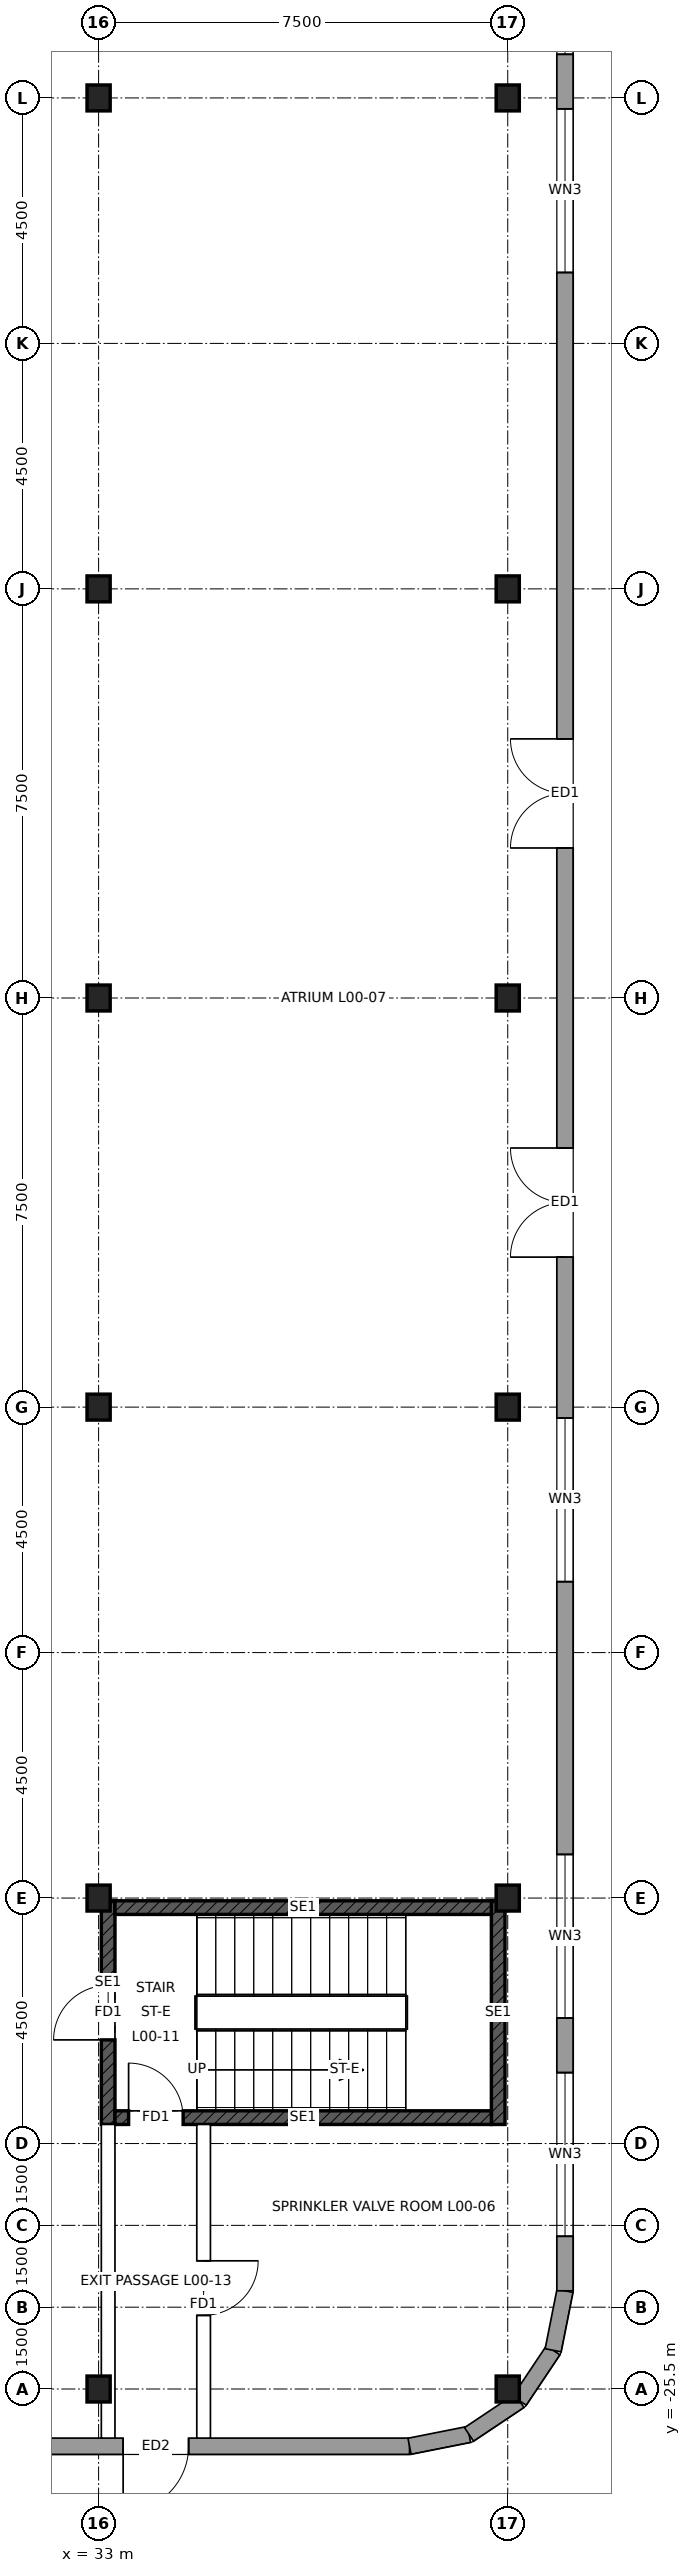
"""IFC4 building model, lengths in metres.
Left out: names, types, materials, properties, quantities, classifications, styles, units other than length and angle.
Written with IfcOpenShell. Run it as: python <this file> out.ifc"""

import sys

from ifc_helpers import new_model, si_unit, direction, frame, frame_2d, origin, origin_2d, place, context, subcontext, project, spatial, rectangle, i_section, extrude, element, fill, save


model = new_model("IFC4")
c1 = context("Model", 3, precision=1e-05, world=origin(), true_north=direction((0.0, 1.0)))
c2 = subcontext(c1, "Body", "Model", "MODEL_VIEW")
j1 = project(units=[si_unit("LENGTHUNIT", "METRE"), si_unit("PLANEANGLEUNIT", "RADIAN")], contexts=[c1])
p1 = place(None, origin())
s1 = spatial("IfcSite", under=j1, at=p1, CompositionType="ELEMENT")
p2 = place(p1, origin())
s2 = spatial("IfcBuilding", under=s1, at=p2, CompositionType="ELEMENT")
p3 = place(p2, origin())
s3 = spatial("IfcBuildingStorey", under=s2, at=p3, CompositionType="ELEMENT", Elevation=0.0)
for number, where, z_axis, x_axis in (
    (1, (33.0, -25.5, -0.3), (0.0, 0.0, 1.0), (1.0, 0.0, 0.0)),
    (2, (33.0, -16.5, -0.3), (0.0, 0.0, 1.0), (1.0, 0.0, 0.0)),
    (3, (33.0, -7.5, -0.3), (0.0, 0.0, 1.0), (1.0, 0.0, 0.0)),
    (4, (33.0, 0.0, -0.3), (0.0, 0.0, 1.0), (1.0, 0.0, 0.0)),
    (5, (33.0, 7.5, -0.3), (0.0, 0.0, 1.0), (1.0, 0.0, 0.0)),
    (6, (33.0, 16.5, -0.3), (0.0, 0.0, 1.0), (1.0, 0.0, 0.0)),
    (7, (40.5, -25.5, -0.3), (0.0, 0.0, 1.0), (1.0, 0.0, 0.0)),
    (8, (40.5, -16.5, -0.3), (0.0, 0.0, 1.0), (1.0, 0.0, 0.0)),
    (9, (40.5, -7.5, -0.3), (0.0, 0.0, 1.0), (1.0, 0.0, 0.0)),
    (10, (40.5, 0.0, -0.3), (0.0, 0.0, 1.0), (1.0, 0.0, 0.0)),
    (11, (40.5, 7.5, -0.3), (0.0, 0.0, 1.0), (1.0, 0.0, 0.0)),
    (12, (40.5, 16.5, -0.3), (0.0, 0.0, 1.0), (1.0, 0.0, 0.0)),
):
    element("IfcColumn", number, at=place(p3, frame(where, z_axis=z_axis, x_axis=x_axis)), inside=s3, PredefinedType="COLUMN", context=c2, shape_type="SweptSolid", body=[
        extrude(i_section(OverallWidth=0.424, OverallDepth=0.475, WebThickness=0.048, FlangeThickness=0.077, at=origin_2d()), origin(), (0.0, 0.0, 1.0), 7.5),
    ])
p4 = place(p3, frame((26.9, -26.55, 0.0), z_axis=(0.0, 0.0, 1.0), x_axis=(1.0, 0.0, 0.0)))
e13 = element("IfcWall", 13, at=p4, inside=s3, PredefinedType="SOLIDWALL", context=c2, shape_type="SweptSolid", body=[
    extrude(rectangle(XDim=11.8, YDim=0.3, at=frame_2d((5.9, 0.0))), origin(), (0.0, 0.0, 1.0), 6.95),
])
p5 = place(p4, frame((6.55, 0.0, 0.0)))
e14 = element("IfcOpeningElement", 14, at=p5, cuts=e13, PredefinedType="OPENING", context=c2, shape_type="SweptSolid", body=[
    extrude(rectangle(XDim=1.2, YDim=2.4, at=frame_2d((0.6, 1.2))), frame((0.0, 0.16, 0.0), z_axis=(0.0, -1.0, 0.0), x_axis=(1.0, 0.0, 0.0)), (0.0, 0.0, 1.0), 0.32),
])
for number, where, z_axis, x_axis in (
    (15, (38.7, -26.55, 0.0), (0.0, 0.0, 1.0), (0.981, 0.195, 0.0)),
    (16, (39.791, -26.333, 0.0), (0.0, 0.0, 1.0), (0.832, 0.555, 0.0)),
    (17, (40.715, -25.715, 0.0), (0.0, 0.0, 1.0), (0.555, 0.832, 0.0)),
    (18, (41.333, -24.791, 0.0), (0.0, 0.0, 1.0), (0.195, 0.981, 0.0)),
):
    element("IfcWall", number, at=place(p3, frame(where, z_axis=z_axis, x_axis=x_axis)), inside=s3, PredefinedType="SOLIDWALL", context=c2, shape_type="SweptSolid", body=[
        extrude(rectangle(XDim=1.112, YDim=0.3, at=frame_2d((0.556, 0.0))), origin(), (0.0, 0.0, 1.0), 6.95),
    ])
p6 = place(p3, frame((41.55, -23.7, 0.0), z_axis=(0.0, 0.0, 1.0), x_axis=(0.0, 1.0, 0.0)))
e19 = element("IfcWall", 19, at=p6, inside=s3, PredefinedType="SOLIDWALL", context=c2, shape_type="SweptSolid", body=[
    extrude(rectangle(XDim=47.4, YDim=0.3, at=frame_2d((23.7, 0.0))), origin(), (0.0, 0.0, 1.0), 6.95),
])
p7 = place(p6, frame((18.95, 0.0, 0.0)))
e20 = element("IfcOpeningElement", 20, at=p7, cuts=e19, PredefinedType="OPENING", context=c2, shape_type="SweptSolid", body=[
    extrude(rectangle(XDim=2.0, YDim=3.0, at=frame_2d((1.0, 1.5))), frame((0.0, 0.16, 0.0), z_axis=(0.0, -1.0, 0.0), x_axis=(1.0, 0.0, 0.0)), (0.0, 0.0, 1.0), 0.32),
])
p8 = place(p6, frame((26.45, 0.0, 0.0)))
e21 = element("IfcOpeningElement", 21, at=p8, cuts=e19, PredefinedType="OPENING", context=c2, shape_type="SweptSolid", body=[
    extrude(rectangle(XDim=2.0, YDim=3.0, at=frame_2d((1.0, 1.5))), frame((0.0, 0.16, 0.0), z_axis=(0.0, -1.0, 0.0), x_axis=(1.0, 0.0, 0.0)), (0.0, 0.0, 1.0), 0.32),
])
p9 = place(p6, frame((1.0, 0.0, 0.6)))
e22 = element("IfcOpeningElement", 22, at=p9, cuts=e19, PredefinedType="OPENING", context=c2, shape_type="SweptSolid", body=[
    extrude(rectangle(XDim=3.0, YDim=4.5, at=frame_2d((1.5, 2.25))), frame((0.0, 0.16, 0.0), z_axis=(0.0, -1.0, 0.0), x_axis=(1.0, 0.0, 0.0)), (0.0, 0.0, 1.0), 0.32),
])
p10 = place(p6, frame((5.0, 0.0, 0.6)))
e23 = element("IfcOpeningElement", 23, at=p10, cuts=e19, PredefinedType="OPENING", context=c2, shape_type="SweptSolid", body=[
    extrude(rectangle(XDim=3.0, YDim=4.5, at=frame_2d((1.5, 2.25))), frame((0.0, 0.16, 0.0), z_axis=(0.0, -1.0, 0.0), x_axis=(1.0, 0.0, 0.0)), (0.0, 0.0, 1.0), 0.32),
])
p11 = place(p6, frame((13.0, 0.0, 0.6)))
e24 = element("IfcOpeningElement", 24, at=p11, cuts=e19, PredefinedType="OPENING", context=c2, shape_type="SweptSolid", body=[
    extrude(rectangle(XDim=3.0, YDim=4.5, at=frame_2d((1.5, 2.25))), frame((0.0, 0.16, 0.0), z_axis=(0.0, -1.0, 0.0), x_axis=(1.0, 0.0, 0.0)), (0.0, 0.0, 1.0), 0.32),
])
p12 = place(p6, frame((37.0, 0.0, 0.6)))
e25 = element("IfcOpeningElement", 25, at=p12, cuts=e19, PredefinedType="OPENING", context=c2, shape_type="SweptSolid", body=[
    extrude(rectangle(XDim=3.0, YDim=4.5, at=frame_2d((1.5, 2.25))), frame((0.0, 0.16, 0.0), z_axis=(0.0, -1.0, 0.0), x_axis=(1.0, 0.0, 0.0)), (0.0, 0.0, 1.0), 0.32),
])
p13 = place(p6, frame((41.0, 0.0, 0.6)))
e26 = element("IfcOpeningElement", 26, at=p13, cuts=e19, PredefinedType="OPENING", context=c2, shape_type="SweptSolid", body=[
    extrude(rectangle(XDim=3.0, YDim=4.5, at=frame_2d((1.5, 2.25))), frame((0.0, 0.16, 0.0), z_axis=(0.0, -1.0, 0.0), x_axis=(1.0, 0.0, 0.0)), (0.0, 0.0, 1.0), 0.32),
])
p14 = place(p3, frame((33.175, -20.65, 0.0), z_axis=(0.0, 0.0, 1.0), x_axis=(0.0, 1.0, 0.0)))
e27 = element("IfcWall", 27, at=p14, inside=s3, PredefinedType="SOLIDWALL", context=c2, shape_type="SweptSolid", body=[
    extrude(rectangle(XDim=4.1, YDim=0.25, at=frame_2d((2.05, 0.0))), origin(), (0.0, 0.0, 1.0), 6.95),
])
p15 = place(p14, frame((1.55, 0.0, 0.0)))
e28 = element("IfcOpeningElement", 28, at=p15, cuts=e27, PredefinedType="OPENING", context=c2, shape_type="SweptSolid", body=[
    extrude(rectangle(XDim=1.0, YDim=2.1, at=frame_2d((0.5, 1.05))), frame((0.0, 0.135, 0.0), z_axis=(0.0, -1.0, 0.0), x_axis=(1.0, 0.0, 0.0)), (0.0, 0.0, 1.0), 0.27),
])
p16 = place(p3, frame((40.325, -20.65, 0.0), z_axis=(0.0, 0.0, 1.0), x_axis=(0.0, 1.0, 0.0)))
e29 = element("IfcWall", 29, at=p16, inside=s3, PredefinedType="SOLIDWALL", context=c2, shape_type="SweptSolid", body=[
    extrude(rectangle(XDim=4.1, YDim=0.25, at=frame_2d((2.05, 0.0))), origin(), (0.0, 0.0, 1.0), 6.95),
])
p17 = place(p3, frame((33.3, -20.525, 0.0), z_axis=(0.0, 0.0, 1.0), x_axis=(1.0, 0.0, 0.0)))
e30 = element("IfcWall", 30, at=p17, inside=s3, PredefinedType="SOLIDWALL", context=c2, shape_type="SweptSolid", body=[
    extrude(rectangle(XDim=6.9, YDim=0.25, at=frame_2d((3.45, 0.0))), origin(), (0.0, 0.0, 1.0), 6.95),
])
p18 = place(p17, frame((0.25, 0.0, 0.0)))
e31 = element("IfcOpeningElement", 31, at=p18, cuts=e30, PredefinedType="OPENING", context=c2, shape_type="SweptSolid", body=[
    extrude(rectangle(XDim=1.0, YDim=2.1, at=frame_2d((0.5, 1.05))), frame((0.0, 0.135, 0.0), z_axis=(0.0, -1.0, 0.0), x_axis=(1.0, 0.0, 0.0)), (0.0, 0.0, 1.0), 0.27),
])
p19 = place(p3, frame((33.3, -16.675, 0.0), z_axis=(0.0, 0.0, 1.0), x_axis=(1.0, 0.0, 0.0)))
e32 = element("IfcWall", 32, at=p19, inside=s3, PredefinedType="SOLIDWALL", context=c2, shape_type="SweptSolid", body=[
    extrude(rectangle(XDim=6.9, YDim=0.25, at=frame_2d((3.45, 0.0))), origin(), (0.0, 0.0, 1.0), 6.95),
])
p20 = place(p3, frame((33.175, -20.65, 0.0), z_axis=(0.0, 0.0, 1.0), x_axis=(0.0, -1.0, 0.0)))
e33 = element("IfcWall", 33, at=p20, inside=s3, PredefinedType="SOLIDWALL", context=c2, shape_type="SweptSolid", body=[
    extrude(rectangle(XDim=5.75, YDim=0.25, at=frame_2d((2.875, 0.0))), origin(), (0.0, 0.0, 1.0), 6.165),
])
p21 = place(p3, frame((34.925, -20.65, 0.0), z_axis=(0.0, 0.0, 1.0), x_axis=(0.0, -1.0, 0.0)))
e34 = element("IfcWall", 34, at=p21, inside=s3, PredefinedType="SOLIDWALL", context=c2, shape_type="SweptSolid", body=[
    extrude(rectangle(XDim=5.75, YDim=0.25, at=frame_2d((2.875, 0.0))), origin(), (0.0, 0.0, 1.0), 6.95),
])
p22 = place(p21, frame((2.5, 0.0, 0.0)))
e35 = element("IfcOpeningElement", 35, at=p22, cuts=e34, PredefinedType="OPENING", context=c2, shape_type="SweptSolid", body=[
    extrude(rectangle(XDim=1.0, YDim=2.1, at=frame_2d((0.5, 1.05))), frame((0.0, 0.135, 0.0), z_axis=(0.0, -1.0, 0.0), x_axis=(1.0, 0.0, 0.0)), (0.0, 0.0, 1.0), 0.27),
])
p23 = place(p5, frame((1.2, 0.0, 0.0), z_axis=(0.0, 0.0, 1.0), x_axis=(-1.0, 0.0, 0.0)))
e36 = element("IfcDoor", 36, at=p23, inside=s3, OperationType="SINGLE_SWING_RIGHT", PredefinedType="DOOR", context=c2, shape_type="SweptSolid", body=[
    extrude(rectangle(XDim=1.2, YDim=2.4, at=frame_2d((0.6, 1.2))), frame((0.0, 0.025, 0.0), z_axis=(0.0, -1.0, 0.0), x_axis=(1.0, 0.0, 0.0)), (0.0, 0.0, 1.0), 0.05),
])
fill(e14, e36)
p24 = place(p7, origin())
e37 = element("IfcDoor", 37, at=p24, inside=s3, OperationType="DOUBLE_DOOR_SINGLE_SWING", PredefinedType="DOOR", context=c2, shape_type="SweptSolid", body=[
    extrude(rectangle(XDim=2.0, YDim=3.0, at=frame_2d((1.0, 1.5))), frame((0.0, 0.025, 0.0), z_axis=(0.0, -1.0, 0.0), x_axis=(1.0, 0.0, 0.0)), (0.0, 0.0, 1.0), 0.05),
])
fill(e20, e37)
p25 = place(p8, origin())
e38 = element("IfcDoor", 38, at=p25, inside=s3, OperationType="DOUBLE_DOOR_SINGLE_SWING", PredefinedType="DOOR", context=c2, shape_type="SweptSolid", body=[
    extrude(rectangle(XDim=2.0, YDim=3.0, at=frame_2d((1.0, 1.5))), frame((0.0, 0.025, 0.0), z_axis=(0.0, -1.0, 0.0), x_axis=(1.0, 0.0, 0.0)), (0.0, 0.0, 1.0), 0.05),
])
fill(e21, e38)
p26 = place(p9, origin())
e39 = element("IfcWindow", 39, at=p26, inside=s3, PartitioningType="SINGLE_PANEL", PredefinedType="WINDOW", context=c2, shape_type="SweptSolid", body=[
    extrude(rectangle(XDim=3.0, YDim=4.5, at=frame_2d((1.5, 2.25))), frame((0.0, 0.03, 0.0), z_axis=(0.0, -1.0, 0.0), x_axis=(1.0, 0.0, 0.0)), (0.0, 0.0, 1.0), 0.06),
])
fill(e22, e39)
p27 = place(p10, origin())
e40 = element("IfcWindow", 40, at=p27, inside=s3, PartitioningType="SINGLE_PANEL", PredefinedType="WINDOW", context=c2, shape_type="SweptSolid", body=[
    extrude(rectangle(XDim=3.0, YDim=4.5, at=frame_2d((1.5, 2.25))), frame((0.0, 0.03, 0.0), z_axis=(0.0, -1.0, 0.0), x_axis=(1.0, 0.0, 0.0)), (0.0, 0.0, 1.0), 0.06),
])
fill(e23, e40)
p28 = place(p11, origin())
e41 = element("IfcWindow", 41, at=p28, inside=s3, PartitioningType="SINGLE_PANEL", PredefinedType="WINDOW", context=c2, shape_type="SweptSolid", body=[
    extrude(rectangle(XDim=3.0, YDim=4.5, at=frame_2d((1.5, 2.25))), frame((0.0, 0.03, 0.0), z_axis=(0.0, -1.0, 0.0), x_axis=(1.0, 0.0, 0.0)), (0.0, 0.0, 1.0), 0.06),
])
fill(e24, e41)
p29 = place(p12, origin())
e42 = element("IfcWindow", 42, at=p29, inside=s3, PartitioningType="SINGLE_PANEL", PredefinedType="WINDOW", context=c2, shape_type="SweptSolid", body=[
    extrude(rectangle(XDim=3.0, YDim=4.5, at=frame_2d((1.5, 2.25))), frame((0.0, 0.03, 0.0), z_axis=(0.0, -1.0, 0.0), x_axis=(1.0, 0.0, 0.0)), (0.0, 0.0, 1.0), 0.06),
])
fill(e25, e42)
p30 = place(p13, origin())
e43 = element("IfcWindow", 43, at=p30, inside=s3, PartitioningType="SINGLE_PANEL", PredefinedType="WINDOW", context=c2, shape_type="SweptSolid", body=[
    extrude(rectangle(XDim=3.0, YDim=4.5, at=frame_2d((1.5, 2.25))), frame((0.0, 0.03, 0.0), z_axis=(0.0, -1.0, 0.0), x_axis=(1.0, 0.0, 0.0)), (0.0, 0.0, 1.0), 0.06),
])
fill(e26, e43)
p31 = place(p15, origin())
e44 = element("IfcDoor", 44, at=p31, inside=s3, OperationType="SINGLE_SWING_LEFT", PredefinedType="DOOR", context=c2, shape_type="SweptSolid", body=[
    extrude(rectangle(XDim=1.0, YDim=2.1, at=frame_2d((0.5, 1.05))), frame((0.0, 0.025, 0.0), z_axis=(0.0, -1.0, 0.0), x_axis=(1.0, 0.0, 0.0)), (0.0, 0.0, 1.0), 0.05),
])
fill(e28, e44)
p32 = place(p18, origin())
e45 = element("IfcDoor", 45, at=p32, inside=s3, OperationType="SINGLE_SWING_LEFT", PredefinedType="DOOR", context=c2, shape_type="SweptSolid", body=[
    extrude(rectangle(XDim=1.0, YDim=2.1, at=frame_2d((0.5, 1.05))), frame((0.0, 0.025, 0.0), z_axis=(0.0, -1.0, 0.0), x_axis=(1.0, 0.0, 0.0)), (0.0, 0.0, 1.0), 0.05),
])
fill(e31, e45)
p33 = place(p22, origin())
e46 = element("IfcDoor", 46, at=p33, inside=s3, OperationType="SINGLE_SWING_LEFT", PredefinedType="DOOR", context=c2, shape_type="SweptSolid", body=[
    extrude(rectangle(XDim=1.0, YDim=2.1, at=frame_2d((0.5, 1.05))), frame((0.0, 0.025, 0.0), z_axis=(0.0, -1.0, 0.0), x_axis=(1.0, 0.0, 0.0)), (0.0, 0.0, 1.0), 0.05),
])
fill(e35, e46)
save(model, sys.argv[1])
